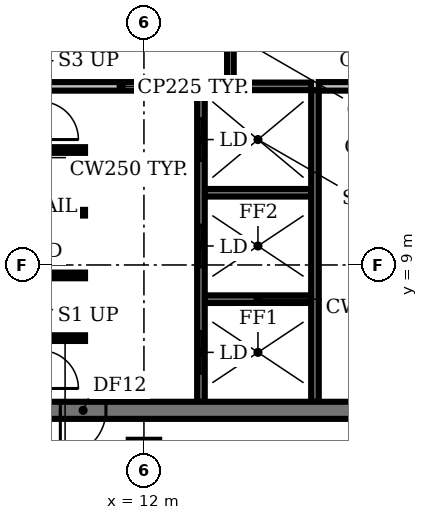
"""IFC4 building model, lengths in metres.
Left out: names, types, materials, properties, quantities, classifications, styles, units other than length and angle.
Written with IfcOpenShell. Run it as: python <this file> out.ifc"""

import sys

from ifc_helpers import new_model, si_unit, direction, frame, frame_2d, origin, origin_2d, place, context, subcontext, project, spatial, rectangle, extrude, element, fill, save


model = new_model("IFC4")
c1 = context("Model", 3, precision=1e-05, world=origin(), true_north=direction((0.0, 1.0)))
c2 = subcontext(c1, "Body", "Model", "MODEL_VIEW")
j1 = project(units=[si_unit("LENGTHUNIT", "METRE"), si_unit("PLANEANGLEUNIT", "RADIAN")], contexts=[c1])
p1 = place(None, origin())
s1 = spatial("IfcSite", under=j1, at=p1, CompositionType="ELEMENT")
p2 = place(p1, origin())
s2 = spatial("IfcBuilding", under=s1, at=p2, CompositionType="ELEMENT")
p3 = place(p2, frame((0.0, 0.0, 222.2)))
s3 = spatial("IfcBuildingStorey", under=s2, at=p3, CompositionType="ELEMENT", Elevation=222.2)
p4 = place(p3, frame((12.0, 4.0, 0.0), z_axis=(0.0, 0.0, 1.0), x_axis=(1.0, 0.0, 0.0)))
e1 = element("IfcColumn", 1, at=p4, inside=s3, PredefinedType="COLUMN", context=c2, shape_type="SweptSolid", body=[
    extrude(rectangle(XDim=0.8, YDim=0.8, at=origin_2d()), origin(), (0.0, 0.0, 1.0), 3.85),
])
p5 = place(p3, frame((9.4, 7.075, 0.0), z_axis=(0.0, 0.0, 1.0), x_axis=(1.0, 0.0, 0.0)))
e2 = element("IfcWall", 2, at=p5, inside=s3, PredefinedType="SHEAR", context=c2, shape_type="SweptSolid", body=[
    extrude(rectangle(XDim=1.05, YDim=0.15, at=frame_2d((0.525, 0.0))), origin(), (0.0, 0.0, 1.0), 3.85),
])
p6 = place(p3, frame((13.6, 8.1, 0.0), z_axis=(0.0, 0.0, 1.0), x_axis=(1.0, 0.0, 0.0)))
e3 = element("IfcWall", 3, at=p6, inside=s3, PredefinedType="SHEAR", context=c2, shape_type="SweptSolid", body=[
    extrude(rectangle(XDim=2.8, YDim=0.2, at=frame_2d((1.4, 0.0))), origin(), (0.0, 0.0, 1.0), 3.85),
])
for number, where, z_axis, x_axis in (
    (4, (9.4, 8.725, 0.0), (0.0, 0.0, 1.0), (1.0, 0.0, 0.0)),
    (5, (9.4, 10.375, 0.0), (0.0, 0.0, 1.0), (1.0, 0.0, 0.0)),
):
    element("IfcWall", number, at=place(p3, frame(where, z_axis=z_axis, x_axis=x_axis)), inside=s3, PredefinedType="SHEAR", context=c2, shape_type="SweptSolid", body=[
        extrude(rectangle(XDim=1.05, YDim=0.15, at=frame_2d((0.525, 0.0))), origin(), (0.0, 0.0, 1.0), 3.85),
    ])
p7 = place(p3, frame((13.6, 10.9, 0.0), z_axis=(0.0, 0.0, 1.0), x_axis=(1.0, 0.0, 0.0)))
e6 = element("IfcWall", 6, at=p7, inside=s3, PredefinedType="SHEAR", context=c2, shape_type="SweptSolid", body=[
    extrude(rectangle(XDim=2.8, YDim=0.2, at=frame_2d((1.4, 0.0))), origin(), (0.0, 0.0, 1.0), 3.85),
])
p8 = place(p3, frame((9.4, 12.025, 0.0), z_axis=(0.0, 0.0, 1.0), x_axis=(1.0, 0.0, 0.0)))
e7 = element("IfcWall", 7, at=p8, inside=s3, PredefinedType="SHEAR", context=c2, shape_type="SweptSolid", body=[
    extrude(rectangle(XDim=1.05, YDim=0.15, at=frame_2d((0.525, 0.0))), origin(), (0.0, 0.0, 1.0), 3.85),
])
p9 = place(p3, frame((9.4, 13.7, 0.0), z_axis=(0.0, 0.0, 1.0), x_axis=(1.0, 0.0, 0.0)))
e8 = element("IfcWall", 8, at=p9, inside=s3, PredefinedType="PARTITIONING", context=c2, shape_type="SweptSolid", body=[
    extrude(rectangle(XDim=4.0, YDim=0.225, at=frame_2d((2.0, 0.0))), origin(), (0.0, 0.0, 1.0), 3.85),
])
p10 = place(p3, frame((13.6, 13.7, 0.0), z_axis=(0.0, 0.0, 1.0), x_axis=(1.0, 0.0, 0.0)))
e9 = element("IfcWall", 9, at=p10, inside=s3, PredefinedType="SHEAR", context=c2, shape_type="SweptSolid", body=[
    extrude(rectangle(XDim=2.8, YDim=0.2, at=frame_2d((1.4, 0.0))), origin(), (0.0, 0.0, 1.0), 3.85),
])
p11 = place(p3, frame((16.6, 13.7, 0.0), z_axis=(0.0, 0.0, 1.0), x_axis=(1.0, 0.0, 0.0)))
e10 = element("IfcWall", 10, at=p11, inside=s3, PredefinedType="PARTITIONING", context=c2, shape_type="SweptSolid", body=[
    extrude(rectangle(XDim=7.4, YDim=0.225, at=frame_2d((3.7, 0.0))), origin(), (0.0, 0.0, 1.0), 3.85),
])
p12 = place(p3, frame((13.5, 5.4, 0.0), z_axis=(0.0, 0.0, 1.0), x_axis=(0.0, 1.0, 0.0)))
e11 = element("IfcWall", 11, at=p12, inside=s3, PredefinedType="SHEAR", context=c2, shape_type="SweptSolid", body=[
    extrude(rectangle(XDim=8.2, YDim=0.2, at=frame_2d((4.1, 0.0))), origin(), (0.0, 0.0, 1.0), 3.85),
])
p13 = place(p12, frame((0.75, 0.0, 0.0)))
e12 = element("IfcOpeningElement", 12, at=p13, cuts=e11, PredefinedType="OPENING", context=c2, shape_type="SweptSolid", body=[
    extrude(rectangle(XDim=1.1, YDim=2.1, at=frame_2d((0.55, 1.05))), frame((0.0, 0.11, 0.0), z_axis=(0.0, -1.0, 0.0), x_axis=(1.0, 0.0, 0.0)), (0.0, 0.0, 1.0), 0.22),
])
p14 = place(p12, frame((3.55, 0.0, 0.0)))
e13 = element("IfcOpeningElement", 13, at=p14, cuts=e11, PredefinedType="OPENING", context=c2, shape_type="SweptSolid", body=[
    extrude(rectangle(XDim=1.1, YDim=2.1, at=frame_2d((0.55, 1.05))), frame((0.0, 0.11, 0.0), z_axis=(0.0, -1.0, 0.0), x_axis=(1.0, 0.0, 0.0)), (0.0, 0.0, 1.0), 0.22),
])
p15 = place(p12, frame((6.35, 0.0, 0.0)))
e14 = element("IfcOpeningElement", 14, at=p15, cuts=e11, PredefinedType="OPENING", context=c2, shape_type="SweptSolid", body=[
    extrude(rectangle(XDim=1.1, YDim=2.1, at=frame_2d((0.55, 1.05))), frame((0.0, 0.11, 0.0), z_axis=(0.0, -1.0, 0.0), x_axis=(1.0, 0.0, 0.0)), (0.0, 0.0, 1.0), 0.22),
])
p16 = place(p3, frame((14.275, 13.8, 0.0), z_axis=(0.0, 0.0, 1.0), x_axis=(0.0, 1.0, 0.0)))
e15 = element("IfcWall", 15, at=p16, inside=s3, PredefinedType="PARTITIONING", context=c2, shape_type="SweptSolid", body=[
    extrude(rectangle(XDim=2.6, YDim=0.175, at=frame_2d((1.3, 0.0))), origin(), (0.0, 0.0, 1.0), 3.85),
])
p17 = place(p3, frame((16.5, 5.4, 0.0), z_axis=(0.0, 0.0, 1.0), x_axis=(0.0, 1.0, 0.0)))
e16 = element("IfcWall", 16, at=p17, inside=s3, PredefinedType="SHEAR", context=c2, shape_type="SweptSolid", body=[
    extrude(rectangle(XDim=8.2, YDim=0.2, at=frame_2d((4.1, 0.0))), origin(), (0.0, 0.0, 1.0), 3.85),
])
p18 = place(p3, frame((24.0, 5.175, 0.0), z_axis=(0.0, 0.0, 1.0), x_axis=(-1.0, 0.0, 0.0)))
e17 = element("IfcWall", 17, at=p18, inside=s3, PredefinedType="SHEAR", context=c2, shape_type="SweptSolid", body=[
    extrude(rectangle(XDim=18.0, YDim=0.45, at=frame_2d((9.0, 0.0))), origin(), (0.0, 0.0, 1.0), 3.85),
])
p19 = place(p18, frame((0.825, 0.0, 0.0)))
e18 = element("IfcOpeningElement", 18, at=p19, cuts=e17, PredefinedType="OPENING", context=c2, shape_type="SweptSolid", body=[
    extrude(rectangle(XDim=1.5, YDim=2.1, at=frame_2d((0.75, 1.05))), frame((0.0, 0.235, 0.0), z_axis=(0.0, -1.0, 0.0), x_axis=(1.0, 0.0, 0.0)), (0.0, 0.0, 1.0), 0.47),
])
p20 = place(p18, frame((15.675, 0.0, 0.0)))
e19 = element("IfcOpeningElement", 19, at=p20, cuts=e17, PredefinedType="OPENING", context=c2, shape_type="SweptSolid", body=[
    extrude(rectangle(XDim=1.5, YDim=2.1, at=frame_2d((0.75, 1.05))), frame((0.0, 0.235, 0.0), z_axis=(0.0, -1.0, 0.0), x_axis=(1.0, 0.0, 0.0)), (0.0, 0.0, 1.0), 0.47),
])
p21 = place(p18, frame((13.0, 0.0, 0.0)))
e20 = element("IfcOpeningElement", 20, at=p21, cuts=e17, PredefinedType="OPENING", context=c2, shape_type="SweptSolid", body=[
    extrude(rectangle(XDim=1.2, YDim=2.1, at=frame_2d((0.6, 1.05))), frame((0.0, 0.235, 0.0), z_axis=(0.0, -1.0, 0.0), x_axis=(1.0, 0.0, 0.0)), (0.0, 0.0, 1.0), 0.47),
])
p22 = place(p18, frame((4.4, 0.0, 0.0)))
e21 = element("IfcOpeningElement", 21, at=p22, cuts=e17, PredefinedType="OPENING", context=c2, shape_type="SweptSolid", body=[
    extrude(rectangle(XDim=1.0, YDim=2.1, at=frame_2d((0.5, 1.05))), frame((0.0, 0.235, 0.0), z_axis=(0.0, -1.0, 0.0), x_axis=(1.0, 0.0, 0.0)), (0.0, 0.0, 1.0), 0.47),
])
p23 = place(p13, origin())
e22 = element("IfcDoor", 22, at=p23, inside=s3, OperationType="DOUBLE_DOOR_SLIDING", PredefinedType="DOOR", context=c2, shape_type="SweptSolid", body=[
    extrude(rectangle(XDim=1.1, YDim=2.1, at=frame_2d((0.55, 1.05))), frame((0.0, 0.025, 0.0), z_axis=(0.0, -1.0, 0.0), x_axis=(1.0, 0.0, 0.0)), (0.0, 0.0, 1.0), 0.05),
])
fill(e12, e22)
p24 = place(p14, origin())
e23 = element("IfcDoor", 23, at=p24, inside=s3, OperationType="DOUBLE_DOOR_SLIDING", PredefinedType="DOOR", context=c2, shape_type="SweptSolid", body=[
    extrude(rectangle(XDim=1.1, YDim=2.1, at=frame_2d((0.55, 1.05))), frame((0.0, 0.025, 0.0), z_axis=(0.0, -1.0, 0.0), x_axis=(1.0, 0.0, 0.0)), (0.0, 0.0, 1.0), 0.05),
])
fill(e13, e23)
p25 = place(p15, origin())
e24 = element("IfcDoor", 24, at=p25, inside=s3, OperationType="DOUBLE_DOOR_SLIDING", PredefinedType="DOOR", context=c2, shape_type="SweptSolid", body=[
    extrude(rectangle(XDim=1.1, YDim=2.1, at=frame_2d((0.55, 1.05))), frame((0.0, 0.025, 0.0), z_axis=(0.0, -1.0, 0.0), x_axis=(1.0, 0.0, 0.0)), (0.0, 0.0, 1.0), 0.05),
])
fill(e14, e24)
p26 = place(p21, origin())
e25 = element("IfcDoor", 25, at=p26, inside=s3, OperationType="SINGLE_SWING_RIGHT", PredefinedType="DOOR", context=c2, shape_type="SweptSolid", body=[
    extrude(rectangle(XDim=1.2, YDim=2.1, at=frame_2d((0.6, 1.05))), frame((0.0, 0.025, 0.0), z_axis=(0.0, -1.0, 0.0), x_axis=(1.0, 0.0, 0.0)), (0.0, 0.0, 1.0), 0.05),
])
fill(e20, e25)
save(model, sys.argv[1])
